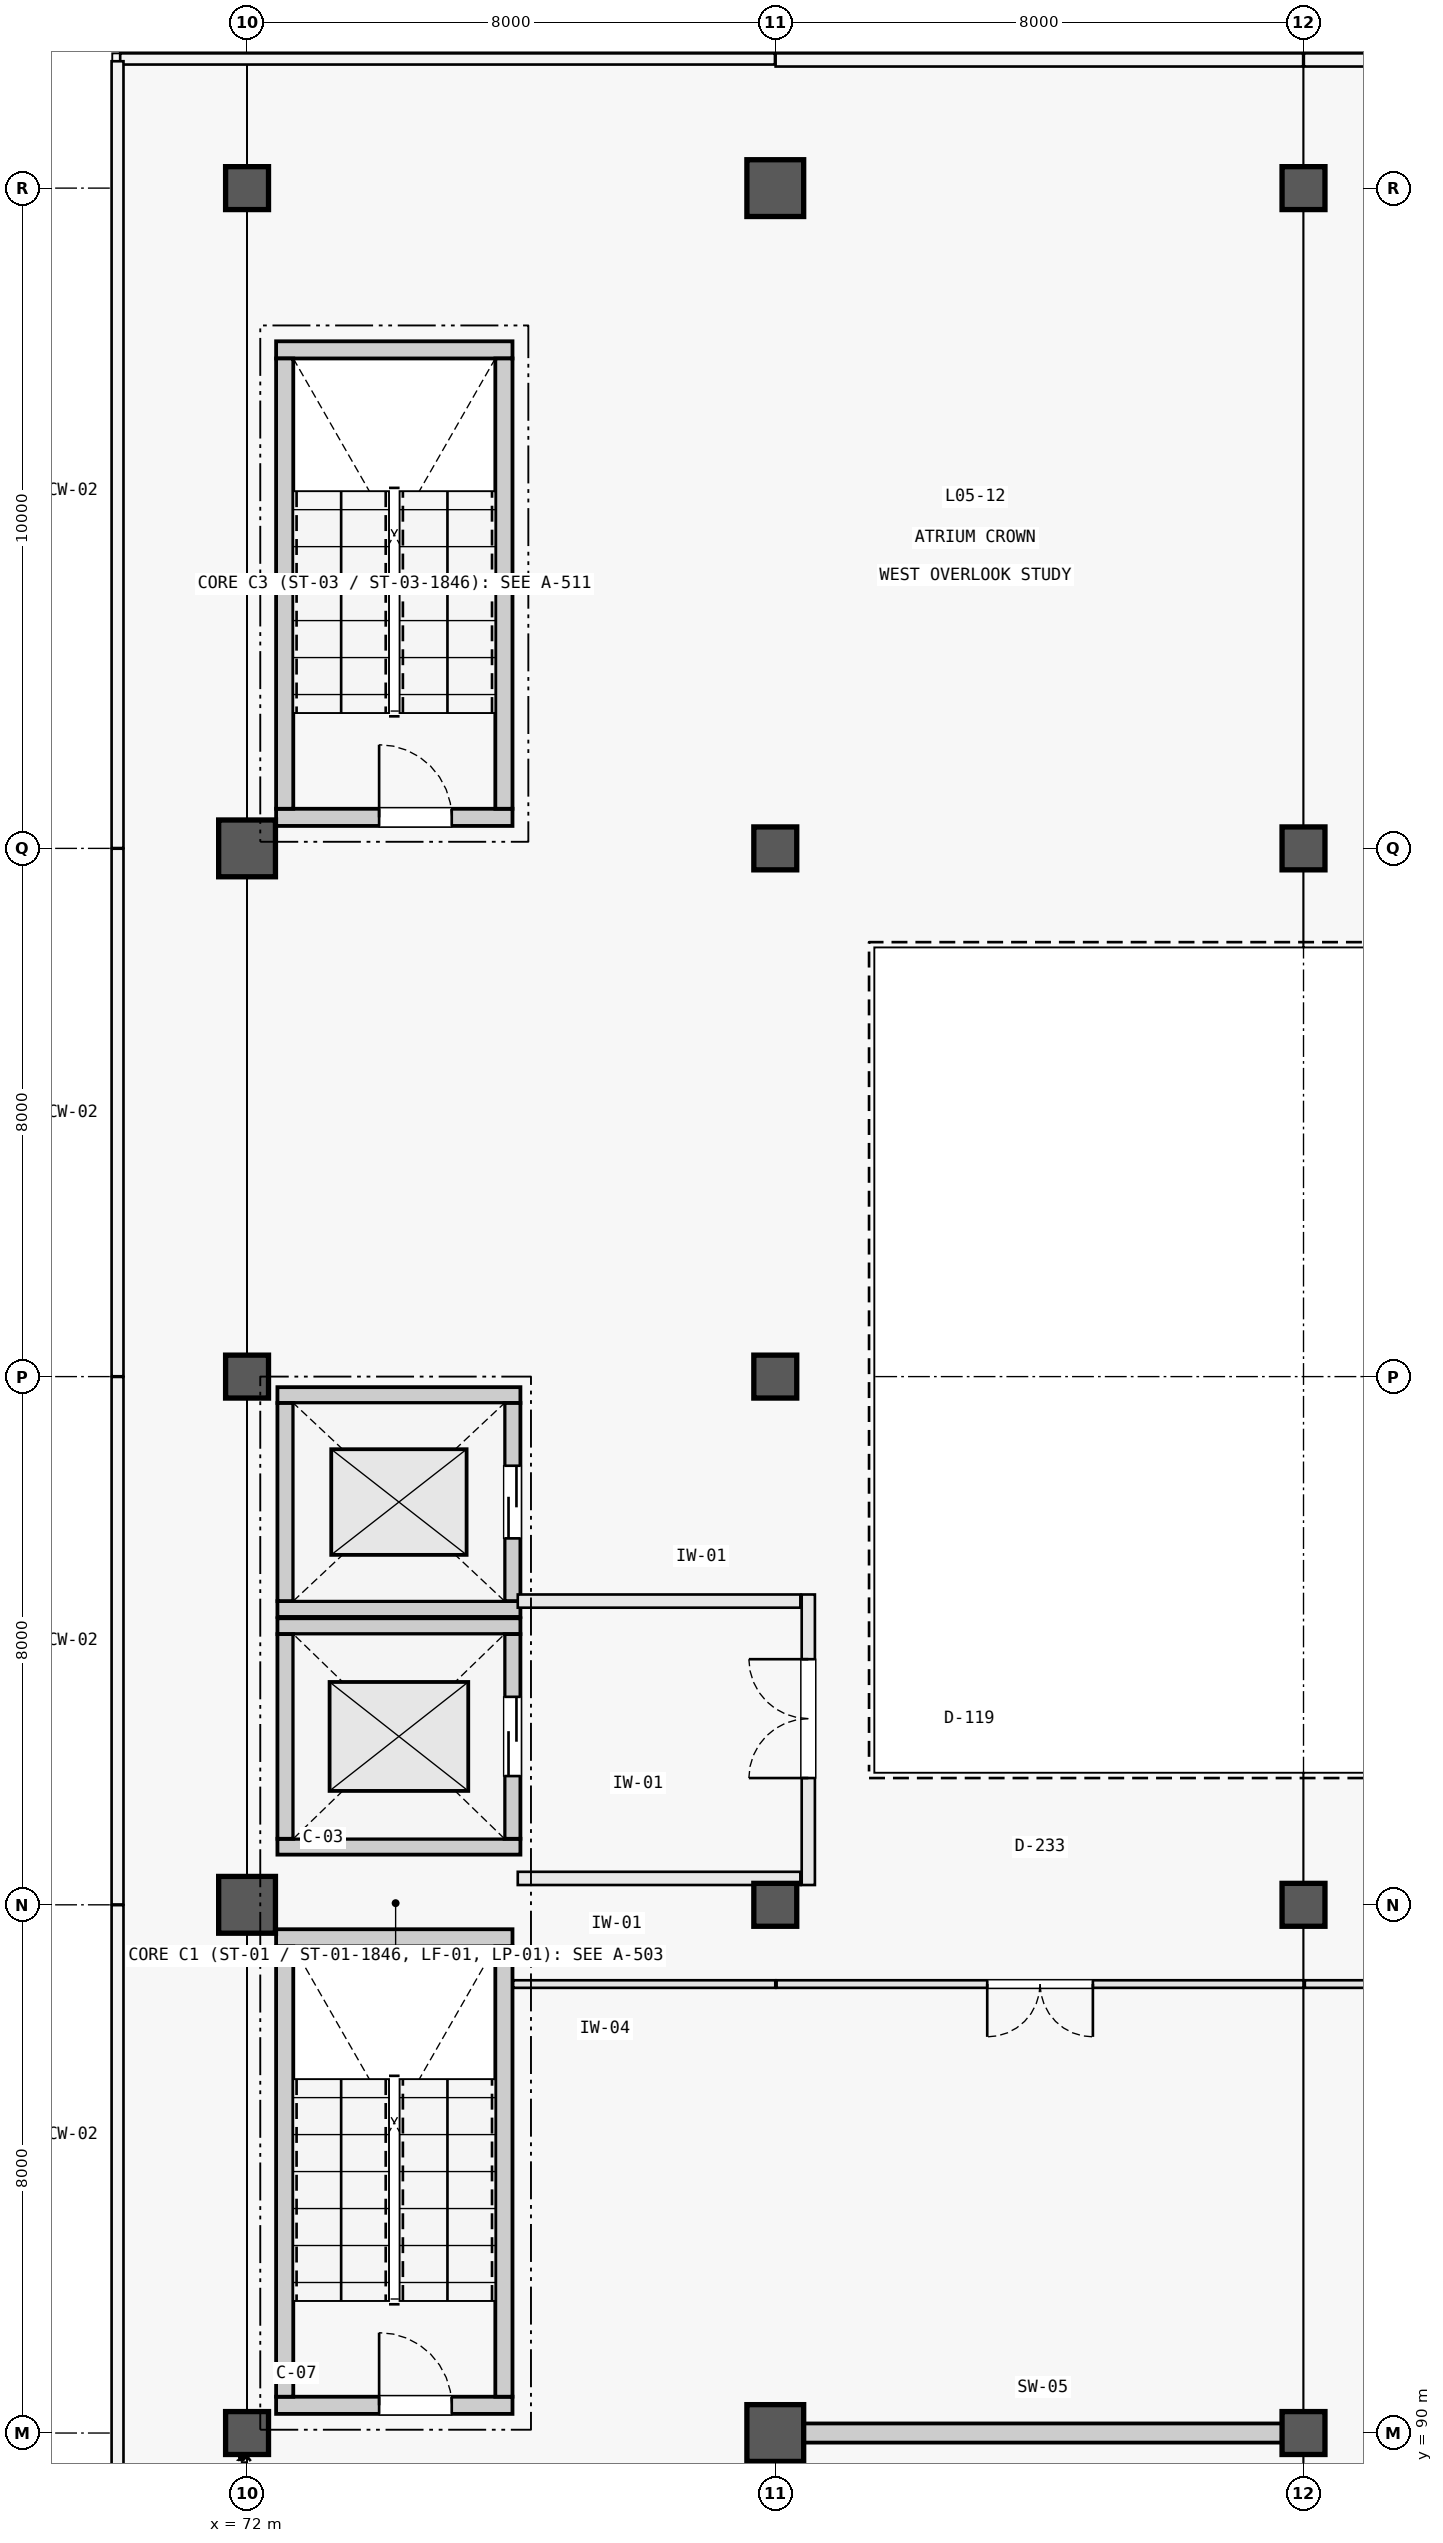
"""IFC4 building model, lengths in metres.
Left out: names, types, materials, properties, quantities, classifications, styles, units other than length and angle.
Written with IfcOpenShell. Run it as: python <this file> out.ifc"""

import sys

from ifc_helpers import new_model, si_unit, direction, frame, frame_2d, origin, origin_2d, place, context, subcontext, project, spatial, rectangle, extrude, element, fill, save


model = new_model("IFC4")
c1 = context("Model", 3, precision=1e-05, world=origin(), true_north=direction((0.0, 1.0)))
c2 = subcontext(c1, "Body", "Model", "MODEL_VIEW")
j1 = project(units=[si_unit("LENGTHUNIT", "METRE"), si_unit("PLANEANGLEUNIT", "RADIAN")], contexts=[c1])
p1 = place(None, origin())
s1 = spatial("IfcSite", under=j1, at=p1, CompositionType="ELEMENT")
p2 = place(p1, origin())
s2 = spatial("IfcBuilding", under=s1, at=p2, CompositionType="ELEMENT")
p3 = place(p2, frame((0.0, 0.0, 20.1)))
s3 = spatial("IfcBuildingStorey", under=s2, at=p3, CompositionType="ELEMENT", Elevation=20.1)
p4 = place(p3, frame((72.0, 90.0, 0.0), z_axis=(0.0, 0.0, 1.0), x_axis=(1.0, 0.0, 0.0)))
e1 = element("IfcColumn", 1, at=p4, inside=s3, PredefinedType="COLUMN", context=c2, shape_type="SweptSolid", body=[
    extrude(rectangle(XDim=0.65, YDim=0.65, at=origin_2d()), origin(), (0.0, 0.0, 1.0), 4.8),
])
p5 = place(p3, frame((72.0, 98.0, 0.0), z_axis=(0.0, 0.0, 1.0), x_axis=(1.0, 0.0, 0.0)))
e2 = element("IfcColumn", 2, at=p5, inside=s3, PredefinedType="COLUMN", context=c2, shape_type="SweptSolid", body=[
    extrude(rectangle(XDim=0.86, YDim=0.86, at=origin_2d()), origin(), (0.0, 0.0, 1.0), 4.8),
])
p6 = place(p3, frame((72.0, 106.0, 0.0), z_axis=(0.0, 0.0, 1.0), x_axis=(1.0, 0.0, 0.0)))
e3 = element("IfcColumn", 3, at=p6, inside=s3, PredefinedType="COLUMN", context=c2, shape_type="SweptSolid", body=[
    extrude(rectangle(XDim=0.65, YDim=0.65, at=origin_2d()), origin(), (0.0, 0.0, 1.0), 4.8),
])
p7 = place(p3, frame((72.0, 114.0, 0.0), z_axis=(0.0, 0.0, 1.0), x_axis=(1.0, 0.0, 0.0)))
e4 = element("IfcColumn", 4, at=p7, inside=s3, PredefinedType="COLUMN", context=c2, shape_type="SweptSolid", body=[
    extrude(rectangle(XDim=0.86, YDim=0.86, at=origin_2d()), origin(), (0.0, 0.0, 1.0), 4.8),
])
p8 = place(p3, frame((72.0, 124.0, 0.0), z_axis=(0.0, 0.0, 1.0), x_axis=(1.0, 0.0, 0.0)))
e5 = element("IfcColumn", 5, at=p8, inside=s3, PredefinedType="COLUMN", context=c2, shape_type="SweptSolid", body=[
    extrude(rectangle(XDim=0.65, YDim=0.65, at=origin_2d()), origin(), (0.0, 0.0, 1.0), 4.8),
])
p9 = place(p3, frame((80.0, 90.0, 0.0), z_axis=(0.0, 0.0, 1.0), x_axis=(1.0, 0.0, 0.0)))
e6 = element("IfcColumn", 6, at=p9, inside=s3, PredefinedType="COLUMN", context=c2, shape_type="SweptSolid", body=[
    extrude(rectangle(XDim=0.86, YDim=0.86, at=origin_2d()), origin(), (0.0, 0.0, 1.0), 4.8),
])
for number, where, z_axis, x_axis in (
    (7, (80.0, 98.0, 0.0), (0.0, 0.0, 1.0), (1.0, 0.0, 0.0)),
    (8, (80.0, 106.0, 0.0), (0.0, 0.0, 1.0), (1.0, 0.0, 0.0)),
    (9, (80.0, 114.0, 0.0), (0.0, 0.0, 1.0), (1.0, 0.0, 0.0)),
):
    element("IfcColumn", number, at=place(p3, frame(where, z_axis=z_axis, x_axis=x_axis)), inside=s3, PredefinedType="COLUMN", context=c2, shape_type="SweptSolid", body=[
        extrude(rectangle(XDim=0.65, YDim=0.65, at=origin_2d()), origin(), (0.0, 0.0, 1.0), 4.8),
    ])
p10 = place(p3, frame((80.0, 124.0, 0.0), z_axis=(0.0, 0.0, 1.0), x_axis=(1.0, 0.0, 0.0)))
e10 = element("IfcColumn", 10, at=p10, inside=s3, PredefinedType="COLUMN", context=c2, shape_type="SweptSolid", body=[
    extrude(rectangle(XDim=0.86, YDim=0.86, at=origin_2d()), origin(), (0.0, 0.0, 1.0), 4.8),
])
for number, where, z_axis, x_axis in (
    (11, (88.0, 90.0, 0.0), (0.0, 0.0, 1.0), (1.0, 0.0, 0.0)),
    (12, (88.0, 98.0, 0.0), (0.0, 0.0, 1.0), (1.0, 0.0, 0.0)),
    (13, (88.0, 114.0, 0.0), (0.0, 0.0, 1.0), (1.0, 0.0, 0.0)),
    (14, (88.0, 124.0, 0.0), (0.0, 0.0, 1.0), (1.0, 0.0, 0.0)),
):
    element("IfcColumn", number, at=place(p3, frame(where, z_axis=z_axis, x_axis=x_axis)), inside=s3, PredefinedType="COLUMN", context=c2, shape_type="SweptSolid", body=[
        extrude(rectangle(XDim=0.65, YDim=0.65, at=origin_2d()), origin(), (0.0, 0.0, 1.0), 4.8),
    ])
p11 = place(p3, frame((80.43, 90.0, 0.0), z_axis=(0.0, 0.0, 1.0), x_axis=(1.0, 0.0, 0.0)))
e15 = element("IfcWall", 15, at=p11, inside=s3, PredefinedType="SHEAR", context=c2, shape_type="SweptSolid", body=[
    extrude(rectangle(XDim=7.245, YDim=0.29, at=frame_2d((3.623, 0.0))), origin(), (0.0, 0.0, 1.0), 4.5),
])
p12 = place(p3, frame((72.44, 90.42, 0.0), z_axis=(0.0, 0.0, 1.0), x_axis=(1.0, 0.0, 0.0)))
e16 = element("IfcWall", 16, at=p12, inside=s3, PredefinedType="SOLIDWALL", context=c2, shape_type="SweptSolid", body=[
    extrude(rectangle(XDim=3.58, YDim=0.26, at=frame_2d((1.79, 0.0))), origin(), (0.0, 0.0, 1.0), 4.8),
])
p13 = place(p12, frame((1.56, 0.0, 0.0)))
e17 = element("IfcOpeningElement", 17, at=p13, cuts=e16, PredefinedType="OPENING", context=c2, shape_type="SweptSolid", body=[
    extrude(rectangle(XDim=1.1, YDim=2.2, at=frame_2d((0.55, 1.1))), frame((0.0, 0.142, 0.0), z_axis=(0.0, -1.0, 0.0), x_axis=(1.0, 0.0, 0.0)), (0.0, 0.0, 1.0), 0.284),
])
p14 = place(p3, frame((72.44, 97.5, 0.0), z_axis=(0.0, 0.0, 1.0), x_axis=(1.0, 0.0, 0.0)))
e18 = element("IfcWall", 18, at=p14, inside=s3, PredefinedType="SOLIDWALL", context=c2, shape_type="SweptSolid", body=[
    extrude(rectangle(XDim=3.58, YDim=0.26, at=frame_2d((1.79, 0.0))), origin(), (0.0, 0.0, 1.0), 4.8),
])
for number, where, z_axis, x_axis in (
    (19, (72.57, 90.55, 0.0), (0.0, 0.0, 1.0), (0.0, 1.0, 0.0)),
    (20, (75.89, 90.55, 0.0), (0.0, 0.0, 1.0), (0.0, 1.0, 0.0)),
):
    element("IfcWall", number, at=place(p3, frame(where, z_axis=z_axis, x_axis=x_axis)), inside=s3, PredefinedType="SOLIDWALL", context=c2, shape_type="SweptSolid", body=[
        extrude(rectangle(XDim=6.82, YDim=0.26, at=frame_2d((3.41, 0.0))), origin(), (0.0, 0.0, 1.0), 4.8),
    ])
p15 = place(p3, frame((72.44, 114.47, 0.0), z_axis=(0.0, 0.0, 1.0), x_axis=(1.0, 0.0, 0.0)))
e21 = element("IfcWall", 21, at=p15, inside=s3, PredefinedType="SOLIDWALL", context=c2, shape_type="SweptSolid", body=[
    extrude(rectangle(XDim=3.58, YDim=0.26, at=frame_2d((1.79, 0.0))), origin(), (0.0, 0.0, 1.0), 4.8),
])
p16 = place(p15, frame((1.56, 0.0, 0.0)))
e22 = element("IfcOpeningElement", 22, at=p16, cuts=e21, PredefinedType="OPENING", context=c2, shape_type="SweptSolid", body=[
    extrude(rectangle(XDim=1.1, YDim=2.2, at=frame_2d((0.55, 1.1))), frame((0.0, 0.142, 0.0), z_axis=(0.0, -1.0, 0.0), x_axis=(1.0, 0.0, 0.0)), (0.0, 0.0, 1.0), 0.284),
])
p17 = place(p3, frame((72.44, 121.55, 0.0), z_axis=(0.0, 0.0, 1.0), x_axis=(1.0, 0.0, 0.0)))
e23 = element("IfcWall", 23, at=p17, inside=s3, PredefinedType="SOLIDWALL", context=c2, shape_type="SweptSolid", body=[
    extrude(rectangle(XDim=3.58, YDim=0.26, at=frame_2d((1.79, 0.0))), origin(), (0.0, 0.0, 1.0), 4.8),
])
for number, where, z_axis, x_axis in (
    (24, (72.57, 114.6, 0.0), (0.0, 0.0, 1.0), (0.0, 1.0, 0.0)),
    (25, (75.89, 114.6, 0.0), (0.0, 0.0, 1.0), (0.0, 1.0, 0.0)),
):
    element("IfcWall", number, at=place(p3, frame(where, z_axis=z_axis, x_axis=x_axis)), inside=s3, PredefinedType="SOLIDWALL", context=c2, shape_type="SweptSolid", body=[
        extrude(rectangle(XDim=6.82, YDim=0.26, at=frame_2d((3.41, 0.0))), origin(), (0.0, 0.0, 1.0), 4.8),
    ])
for number, where, z_axis, x_axis in (
    (26, (72.46, 98.88, 0.0), (0.0, 0.0, 1.0), (1.0, 0.0, 0.0)),
    (27, (72.46, 102.22, 0.0), (0.0, 0.0, 1.0), (1.0, 0.0, 0.0)),
):
    element("IfcWall", number, at=place(p3, frame(where, z_axis=z_axis, x_axis=x_axis)), inside=s3, PredefinedType="SOLIDWALL", context=c2, shape_type="SweptSolid", body=[
        extrude(rectangle(XDim=3.68, YDim=0.24, at=frame_2d((1.84, 0.0))), origin(), (0.0, 0.0, 1.0), 4.8),
    ])
p18 = place(p3, frame((72.58, 99.0, 0.0), z_axis=(0.0, 0.0, 1.0), x_axis=(0.0, 1.0, 0.0)))
e28 = element("IfcWall", 28, at=p18, inside=s3, PredefinedType="SOLIDWALL", context=c2, shape_type="SweptSolid", body=[
    extrude(rectangle(XDim=3.1, YDim=0.24, at=frame_2d((1.55, 0.0))), origin(), (0.0, 0.0, 1.0), 4.8),
])
p19 = place(p3, frame((76.02, 99.0, 0.0), z_axis=(0.0, 0.0, 1.0), x_axis=(0.0, 1.0, 0.0)))
e29 = element("IfcWall", 29, at=p19, inside=s3, PredefinedType="SOLIDWALL", context=c2, shape_type="SweptSolid", body=[
    extrude(rectangle(XDim=3.1, YDim=0.24, at=frame_2d((1.55, 0.0))), origin(), (0.0, 0.0, 1.0), 4.8),
])
p20 = place(p19, frame((0.95, 0.0, 0.0)))
e30 = element("IfcOpeningElement", 30, at=p20, cuts=e29, PredefinedType="OPENING", context=c2, shape_type="SweptSolid", body=[
    extrude(rectangle(XDim=1.2, YDim=2.2, at=frame_2d((0.6, 1.1))), frame((0.0, 0.132, 0.0), z_axis=(0.0, -1.0, 0.0), x_axis=(1.0, 0.0, 0.0)), (0.0, 0.0, 1.0), 0.264),
])
for number, where, z_axis, x_axis in (
    (31, (72.46, 102.48, 0.0), (0.0, 0.0, 1.0), (1.0, 0.0, 0.0)),
    (32, (72.46, 105.72, 0.0), (0.0, 0.0, 1.0), (1.0, 0.0, 0.0)),
):
    element("IfcWall", number, at=place(p3, frame(where, z_axis=z_axis, x_axis=x_axis)), inside=s3, PredefinedType="SOLIDWALL", context=c2, shape_type="SweptSolid", body=[
        extrude(rectangle(XDim=3.68, YDim=0.24, at=frame_2d((1.84, 0.0))), origin(), (0.0, 0.0, 1.0), 4.8),
    ])
p21 = place(p3, frame((72.58, 102.6, 0.0), z_axis=(0.0, 0.0, 1.0), x_axis=(0.0, 1.0, 0.0)))
e33 = element("IfcWall", 33, at=p21, inside=s3, PredefinedType="SOLIDWALL", context=c2, shape_type="SweptSolid", body=[
    extrude(rectangle(XDim=3.0, YDim=0.24, at=frame_2d((1.5, 0.0))), origin(), (0.0, 0.0, 1.0), 4.8),
])
p22 = place(p3, frame((76.02, 102.6, 0.0), z_axis=(0.0, 0.0, 1.0), x_axis=(0.0, 1.0, 0.0)))
e34 = element("IfcWall", 34, at=p22, inside=s3, PredefinedType="SOLIDWALL", context=c2, shape_type="SweptSolid", body=[
    extrude(rectangle(XDim=3.0, YDim=0.24, at=frame_2d((1.5, 0.0))), origin(), (0.0, 0.0, 1.0), 4.8),
])
p23 = place(p22, frame((0.95, 0.0, 0.0)))
e35 = element("IfcOpeningElement", 35, at=p23, cuts=e34, PredefinedType="OPENING", context=c2, shape_type="SweptSolid", body=[
    extrude(rectangle(XDim=1.1, YDim=2.2, at=frame_2d((0.55, 1.1))), frame((0.0, 0.132, 0.0), z_axis=(0.0, -1.0, 0.0), x_axis=(1.0, 0.0, 0.0)), (0.0, 0.0, 1.0), 0.264),
])
for number, where, z_axis, x_axis in (
    (36, (76.1, 98.4, 0.0), (0.0, 0.0, 1.0), (1.0, 0.0, 0.0)),
    (37, (76.1, 102.6, 0.0), (0.0, 0.0, 1.0), (1.0, 0.0, 0.0)),
):
    element("IfcWall", number, at=place(p3, frame(where, z_axis=z_axis, x_axis=x_axis)), inside=s3, PredefinedType="PARTITIONING", context=c2, shape_type="SweptSolid", body=[
        extrude(rectangle(XDim=4.28, YDim=0.2, at=frame_2d((2.14, 0.0))), origin(), (0.0, 0.0, 1.0), 3.52),
    ])
p24 = place(p3, frame((80.5, 98.3, 0.0), z_axis=(0.0, 0.0, 1.0), x_axis=(0.0, 1.0, 0.0)))
e38 = element("IfcWall", 38, at=p24, inside=s3, PredefinedType="PARTITIONING", context=c2, shape_type="SweptSolid", body=[
    extrude(rectangle(XDim=4.4, YDim=0.2, at=frame_2d((2.2, 0.0))), origin(), (0.0, 0.0, 1.0), 3.52),
])
p25 = place(p24, frame((1.62, 0.0, 0.0)))
e39 = element("IfcOpeningElement", 39, at=p25, cuts=e38, PredefinedType="OPENING", context=c2, shape_type="SweptSolid", body=[
    extrude(rectangle(XDim=1.8, YDim=2.25, at=frame_2d((0.9, 1.125))), frame((0.0, 0.112, 0.0), z_axis=(0.0, -1.0, 0.0), x_axis=(1.0, 0.0, 0.0)), (0.0, 0.0, 1.0), 0.224),
])
p26 = place(p3, frame((76.03, 96.8, 0.0), z_axis=(0.0, 0.0, 1.0), x_axis=(1.0, 0.0, 0.0)))
e40 = element("IfcWall", 40, at=p26, inside=s3, PredefinedType="PARTITIONING", context=c2, shape_type="SweptSolid", body=[
    extrude(rectangle(XDim=3.97, YDim=0.115, at=frame_2d((1.985, 0.0))), origin(), (0.0, 0.0, 1.0), 3.35),
])
p27 = place(p3, frame((80.02, 96.8, 0.0), z_axis=(0.0, 0.0, 1.0), x_axis=(1.0, 0.0, 0.0)))
e41 = element("IfcWall", 41, at=p27, inside=s3, PredefinedType="PARTITIONING", context=c2, shape_type="SweptSolid", body=[
    extrude(rectangle(XDim=7.98, YDim=0.115, at=frame_2d((3.99, 0.0))), origin(), (0.0, 0.0, 1.0), 3.35),
])
p28 = place(p27, frame((3.19, 0.0, 0.0)))
e42 = element("IfcOpeningElement", 42, at=p28, cuts=e41, PredefinedType="OPENING", context=c2, shape_type="SweptSolid", body=[
    extrude(rectangle(XDim=1.6, YDim=2.2, at=frame_2d((0.8, 1.1))), frame((0.0, 0.069, 0.0), z_axis=(0.0, -1.0, 0.0), x_axis=(1.0, 0.0, 0.0)), (0.0, 0.0, 1.0), 0.139),
])
p29 = place(p3, frame((88.02, 96.8, 0.0), z_axis=(0.0, 0.0, 1.0), x_axis=(1.0, 0.0, 0.0)))
e43 = element("IfcWall", 43, at=p29, inside=s3, PredefinedType="PARTITIONING", context=c2, shape_type="SweptSolid", body=[
    extrude(rectangle(XDim=7.98, YDim=0.115, at=frame_2d((3.99, 0.0))), origin(), (0.0, 0.0, 1.0), 3.35),
])
p30 = place(p29, frame((3.515, 0.0, 0.0)))
e44 = element("IfcOpeningElement", 44, at=p30, cuts=e43, PredefinedType="OPENING", context=c2, shape_type="SweptSolid", body=[
    extrude(rectangle(XDim=0.95, YDim=2.15, at=frame_2d((0.475, 1.075))), frame((0.0, 0.069, 0.0), z_axis=(0.0, -1.0, 0.0), x_axis=(1.0, 0.0, 0.0)), (0.0, 0.0, 1.0), 0.139),
])
p31 = place(p13, origin())
e45 = element("IfcDoor", 45, at=p31, inside=s3, OperationType="SINGLE_SWING_LEFT", PredefinedType="DOOR", context=c2, shape_type="SweptSolid", body=[
    extrude(rectangle(XDim=1.1, YDim=2.2, at=frame_2d((0.55, 1.1))), frame((0.0, 0.025, 0.0), z_axis=(0.0, -1.0, 0.0), x_axis=(1.0, 0.0, 0.0)), (0.0, 0.0, 1.0), 0.05),
])
fill(e17, e45)
p32 = place(p16, origin())
e46 = element("IfcDoor", 46, at=p32, inside=s3, OperationType="SINGLE_SWING_LEFT", PredefinedType="DOOR", context=c2, shape_type="SweptSolid", body=[
    extrude(rectangle(XDim=1.1, YDim=2.2, at=frame_2d((0.55, 1.1))), frame((0.0, 0.025, 0.0), z_axis=(0.0, -1.0, 0.0), x_axis=(1.0, 0.0, 0.0)), (0.0, 0.0, 1.0), 0.05),
])
fill(e22, e46)
p33 = place(p20, origin())
e47 = element("IfcDoor", 47, at=p33, inside=s3, OperationType="DOUBLE_DOOR_SLIDING", PredefinedType="DOOR", context=c2, shape_type="SweptSolid", body=[
    extrude(rectangle(XDim=1.2, YDim=2.2, at=frame_2d((0.6, 1.1))), frame((0.0, 0.025, 0.0), z_axis=(0.0, -1.0, 0.0), x_axis=(1.0, 0.0, 0.0)), (0.0, 0.0, 1.0), 0.05),
])
fill(e30, e47)
p34 = place(p23, origin())
e48 = element("IfcDoor", 48, at=p34, inside=s3, OperationType="DOUBLE_DOOR_SLIDING", PredefinedType="DOOR", context=c2, shape_type="SweptSolid", body=[
    extrude(rectangle(XDim=1.1, YDim=2.2, at=frame_2d((0.55, 1.1))), frame((0.0, 0.025, 0.0), z_axis=(0.0, -1.0, 0.0), x_axis=(1.0, 0.0, 0.0)), (0.0, 0.0, 1.0), 0.05),
])
fill(e35, e48)
p35 = place(p25, origin())
e49 = element("IfcDoor", 49, at=p35, inside=s3, OperationType="DOUBLE_DOOR_SINGLE_SWING", PredefinedType="DOOR", context=c2, shape_type="SweptSolid", body=[
    extrude(rectangle(XDim=1.8, YDim=2.25, at=frame_2d((0.9, 1.125))), frame((0.0, 0.025, 0.0), z_axis=(0.0, -1.0, 0.0), x_axis=(1.0, 0.0, 0.0)), (0.0, 0.0, 1.0), 0.05),
])
fill(e39, e49)
p36 = place(p28, frame((1.6, 0.0, 0.0), z_axis=(0.0, 0.0, 1.0), x_axis=(-1.0, 0.0, 0.0)))
e50 = element("IfcDoor", 50, at=p36, inside=s3, OperationType="DOUBLE_DOOR_SINGLE_SWING", PredefinedType="DOOR", context=c2, shape_type="SweptSolid", body=[
    extrude(rectangle(XDim=1.6, YDim=2.2, at=frame_2d((0.8, 1.1))), frame((0.0, 0.025, 0.0), z_axis=(0.0, -1.0, 0.0), x_axis=(1.0, 0.0, 0.0)), (0.0, 0.0, 1.0), 0.05),
])
fill(e42, e50)
save(model, sys.argv[1])
